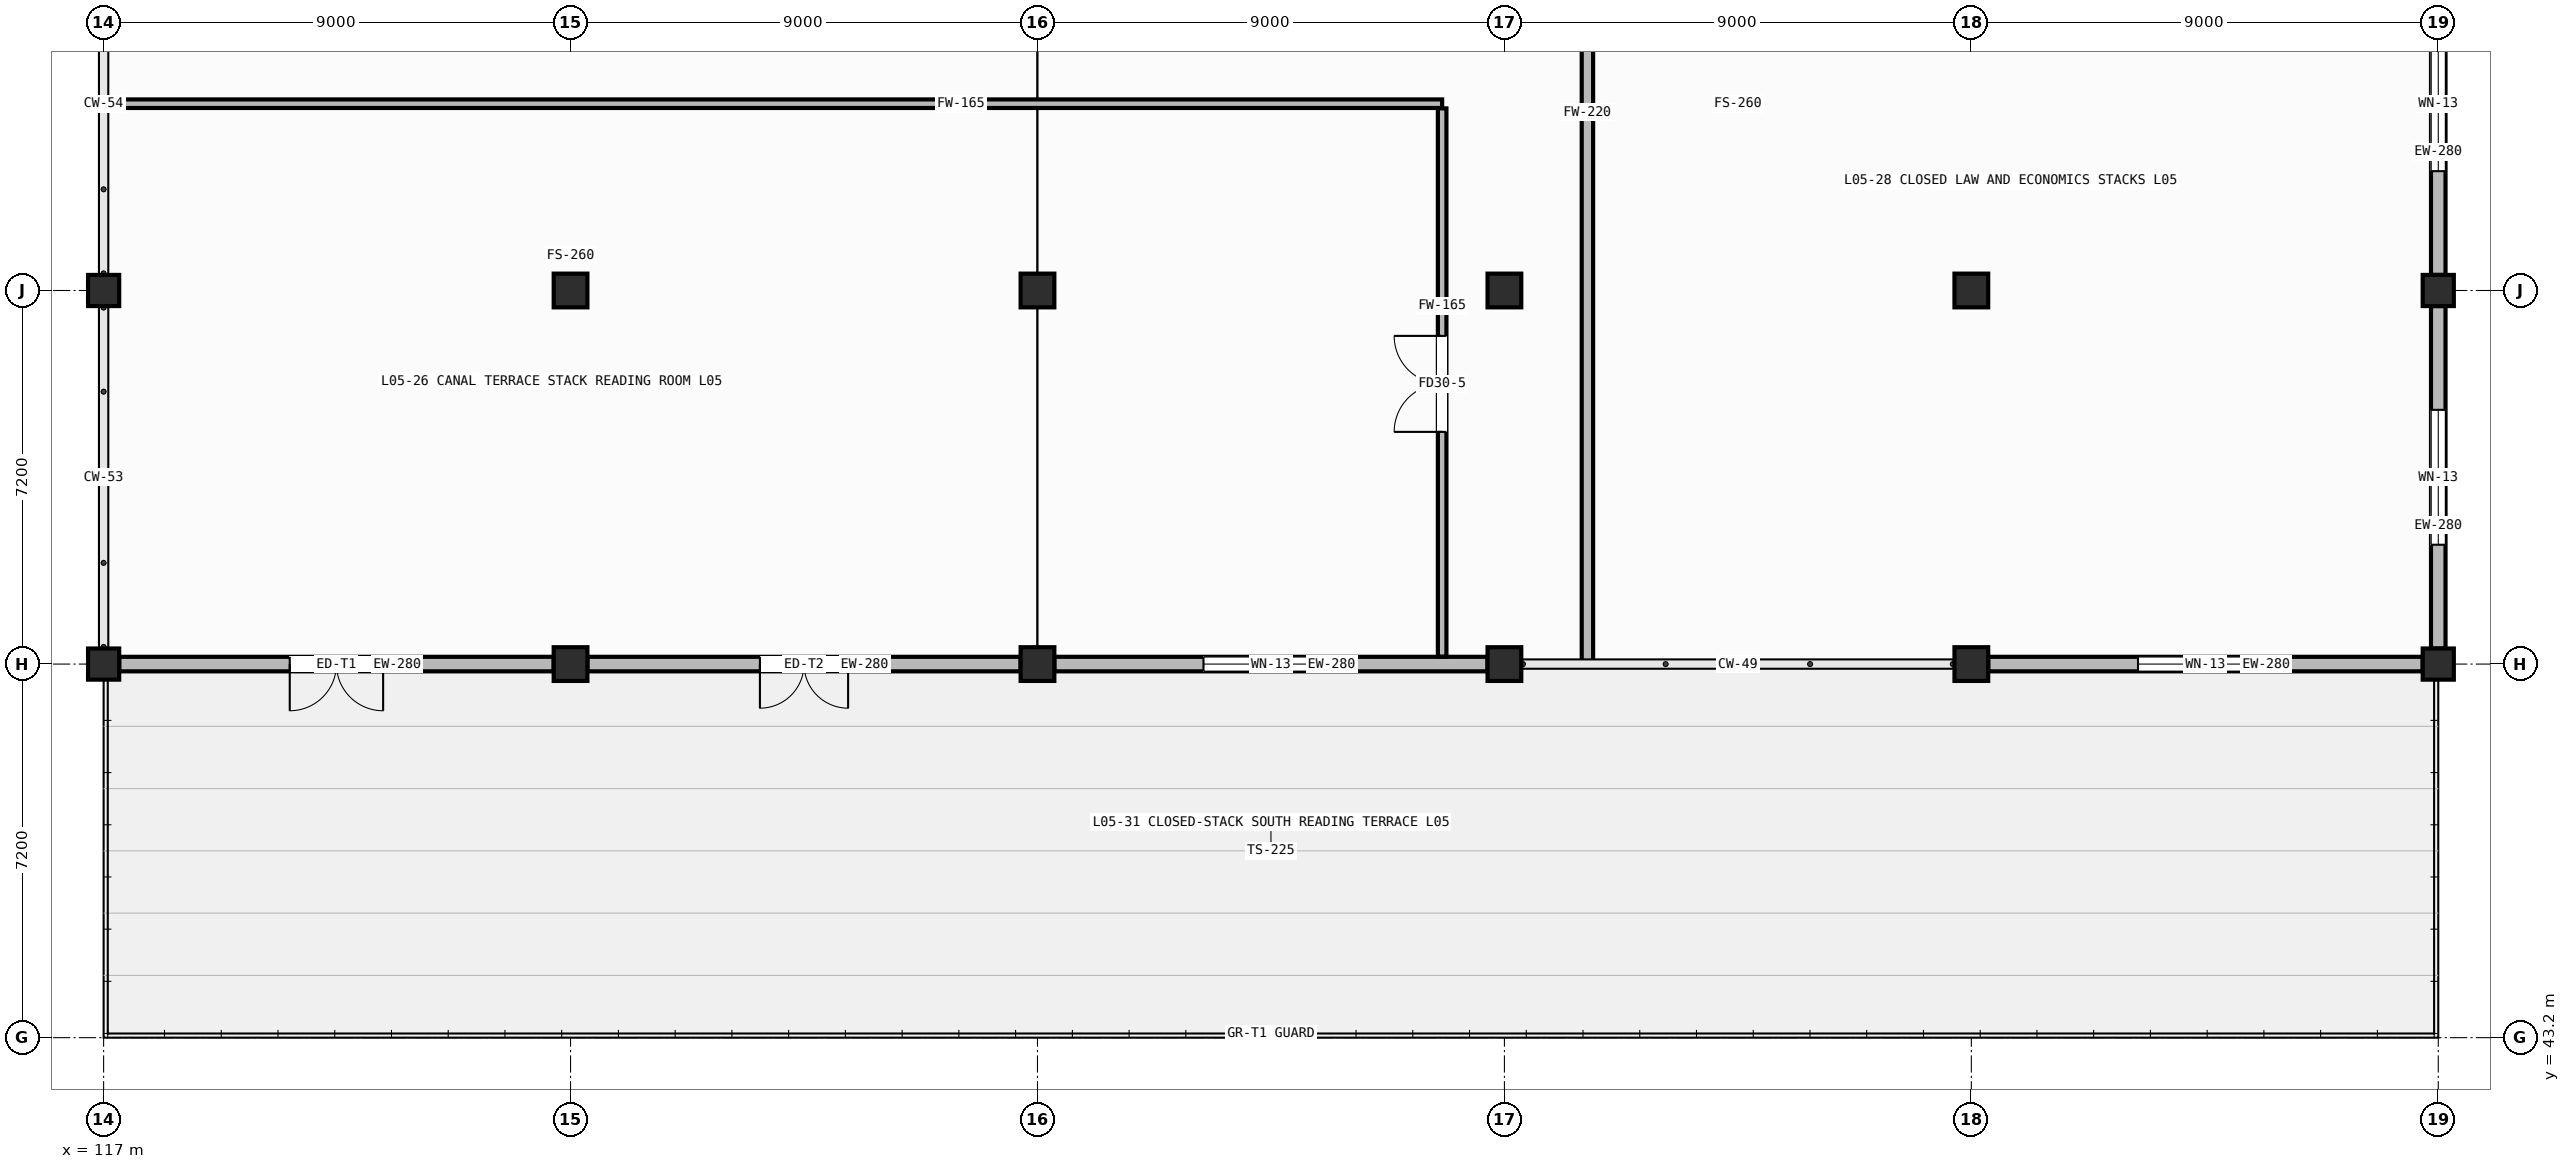
"""IFC4 building model, lengths in metres.
Left out: names, types, materials, properties, quantities, classifications, styles, units other than length and angle.
Written with IfcOpenShell. Run it as: python <this file> out.ifc"""

import sys

from ifc_helpers import new_model, si_unit, direction, frame, frame_2d, origin, origin_2d, place, context, subcontext, project, spatial, rectangle, hollow_rectangle, extrude, element, fill, save


model = new_model("IFC4")
c1 = context("Model", 3, precision=1e-05, world=origin(), true_north=direction((0.0, 1.0)))
c2 = subcontext(c1, "Body", "Model", "MODEL_VIEW")
j1 = project(units=[si_unit("LENGTHUNIT", "METRE"), si_unit("PLANEANGLEUNIT", "RADIAN")], contexts=[c1])
p1 = place(None, origin())
s1 = spatial("IfcSite", under=j1, at=p1, CompositionType="ELEMENT")
p2 = place(p1, origin())
s2 = spatial("IfcBuilding", under=s1, at=p2, CompositionType="ELEMENT")
p3 = place(p2, frame((0.0, 0.0, 17.0)))
s3 = spatial("IfcBuildingStorey", under=s2, at=p3, CompositionType="ELEMENT", Elevation=17.0)
p4 = place(p3, frame((117.0, 50.4, 0.0), z_axis=(0.0, 0.0, 1.0), x_axis=(1.0, 0.0, 0.0)))
e1 = element("IfcColumn", 1, at=p4, inside=s3, PredefinedType="COLUMN", context=c2, shape_type="SweptSolid", body=[
    extrude(hollow_rectangle(XDim=0.6, YDim=0.6, WallThickness=0.025, at=origin_2d()), origin(), (0.0, 0.0, 1.0), 3.36),
])
p5 = place(p3, frame((117.0, 57.6, 0.0), z_axis=(0.0, 0.0, 1.0), x_axis=(1.0, 0.0, 0.0)))
e2 = element("IfcColumn", 2, at=p5, inside=s3, PredefinedType="COLUMN", context=c2, shape_type="SweptSolid", body=[
    extrude(hollow_rectangle(XDim=0.6, YDim=0.6, WallThickness=0.025, at=origin_2d()), origin(), (0.0, 0.0, 1.0), 3.6),
])
p6 = place(p3, frame((126.0, 50.4, 0.0), z_axis=(0.0, 0.0, 1.0), x_axis=(1.0, 0.0, 0.0)))
e3 = element("IfcColumn", 3, at=p6, inside=s3, PredefinedType="COLUMN", context=c2, shape_type="SweptSolid", body=[
    extrude(hollow_rectangle(XDim=0.65, YDim=0.65, WallThickness=0.025, at=origin_2d()), origin(), (0.0, 0.0, 1.0), 3.36),
])
p7 = place(p3, frame((126.0, 57.6, 0.0), z_axis=(0.0, 0.0, 1.0), x_axis=(1.0, 0.0, 0.0)))
e4 = element("IfcColumn", 4, at=p7, inside=s3, PredefinedType="COLUMN", context=c2, shape_type="SweptSolid", body=[
    extrude(hollow_rectangle(XDim=0.65, YDim=0.65, WallThickness=0.025, at=origin_2d()), origin(), (0.0, 0.0, 1.0), 3.6),
])
p8 = place(p3, frame((135.0, 50.4, 0.0), z_axis=(0.0, 0.0, 1.0), x_axis=(1.0, 0.0, 0.0)))
e5 = element("IfcColumn", 5, at=p8, inside=s3, PredefinedType="COLUMN", context=c2, shape_type="SweptSolid", body=[
    extrude(hollow_rectangle(XDim=0.65, YDim=0.65, WallThickness=0.025, at=origin_2d()), origin(), (0.0, 0.0, 1.0), 3.36),
])
p9 = place(p3, frame((135.0, 57.6, 0.0), z_axis=(0.0, 0.0, 1.0), x_axis=(1.0, 0.0, 0.0)))
e6 = element("IfcColumn", 6, at=p9, inside=s3, PredefinedType="COLUMN", context=c2, shape_type="SweptSolid", body=[
    extrude(hollow_rectangle(XDim=0.65, YDim=0.65, WallThickness=0.025, at=origin_2d()), origin(), (0.0, 0.0, 1.0), 3.6),
])
p10 = place(p3, frame((144.0, 50.4, 0.0), z_axis=(0.0, 0.0, 1.0), x_axis=(1.0, 0.0, 0.0)))
e7 = element("IfcColumn", 7, at=p10, inside=s3, PredefinedType="COLUMN", context=c2, shape_type="SweptSolid", body=[
    extrude(hollow_rectangle(XDim=0.65, YDim=0.65, WallThickness=0.025, at=origin_2d()), origin(), (0.0, 0.0, 1.0), 3.36),
])
p11 = place(p3, frame((144.0, 57.6, 0.0), z_axis=(0.0, 0.0, 1.0), x_axis=(1.0, 0.0, 0.0)))
e8 = element("IfcColumn", 8, at=p11, inside=s3, PredefinedType="COLUMN", context=c2, shape_type="SweptSolid", body=[
    extrude(hollow_rectangle(XDim=0.65, YDim=0.65, WallThickness=0.025, at=origin_2d()), origin(), (0.0, 0.0, 1.0), 3.6),
])
p12 = place(p3, frame((153.0, 50.4, 0.0), z_axis=(0.0, 0.0, 1.0), x_axis=(1.0, 0.0, 0.0)))
e9 = element("IfcColumn", 9, at=p12, inside=s3, PredefinedType="COLUMN", context=c2, shape_type="SweptSolid", body=[
    extrude(hollow_rectangle(XDim=0.65, YDim=0.65, WallThickness=0.025, at=origin_2d()), origin(), (0.0, 0.0, 1.0), 3.36),
])
p13 = place(p3, frame((153.0, 57.6, 0.0), z_axis=(0.0, 0.0, 1.0), x_axis=(1.0, 0.0, 0.0)))
e10 = element("IfcColumn", 10, at=p13, inside=s3, PredefinedType="COLUMN", context=c2, shape_type="SweptSolid", body=[
    extrude(hollow_rectangle(XDim=0.65, YDim=0.65, WallThickness=0.025, at=origin_2d()), origin(), (0.0, 0.0, 1.0), 3.6),
])
p14 = place(p3, frame((162.0, 50.4, 0.0), z_axis=(0.0, 0.0, 1.0), x_axis=(1.0, 0.0, 0.0)))
e11 = element("IfcColumn", 11, at=p14, inside=s3, PredefinedType="COLUMN", context=c2, shape_type="SweptSolid", body=[
    extrude(hollow_rectangle(XDim=0.6, YDim=0.6, WallThickness=0.025, at=origin_2d()), origin(), (0.0, 0.0, 1.0), 3.36),
])
p15 = place(p3, frame((162.0, 57.6, 0.0), z_axis=(0.0, 0.0, 1.0), x_axis=(1.0, 0.0, 0.0)))
e12 = element("IfcColumn", 12, at=p15, inside=s3, PredefinedType="COLUMN", context=c2, shape_type="SweptSolid", body=[
    extrude(hollow_rectangle(XDim=0.6, YDim=0.6, WallThickness=0.025, at=origin_2d()), origin(), (0.0, 0.0, 1.0), 3.6),
])
p16 = place(p3, frame((117.3, 50.4, 0.0), z_axis=(0.0, 0.0, 1.0), x_axis=(1.0, 0.0, 0.0)))
e13 = element("IfcWall", 13, at=p16, inside=s3, PredefinedType="STANDARD", context=c2, shape_type="SweptSolid", body=[
    extrude(rectangle(XDim=8.375, YDim=0.28, at=frame_2d((4.188, 0.0))), origin(), (0.0, 0.0, 1.0), 2.97),
])
p17 = place(p16, frame((3.288, 0.0, 0.0)))
e14 = element("IfcOpeningElement", 14, at=p17, cuts=e13, PredefinedType="OPENING", context=c2, shape_type="SweptSolid", body=[
    extrude(rectangle(XDim=1.8, YDim=2.1, at=frame_2d((0.9, 1.05))), frame((0.0, 0.152, 0.0), z_axis=(0.0, -1.0, 0.0), x_axis=(1.0, 0.0, 0.0)), (0.0, 0.0, 1.0), 0.304),
])
p18 = place(p3, frame((126.325, 50.4, 0.0), z_axis=(0.0, 0.0, 1.0), x_axis=(1.0, 0.0, 0.0)))
e15 = element("IfcWall", 15, at=p18, inside=s3, PredefinedType="STANDARD", context=c2, shape_type="SweptSolid", body=[
    extrude(rectangle(XDim=8.35, YDim=0.28, at=frame_2d((4.175, 0.0))), origin(), (0.0, 0.0, 1.0), 2.97),
])
p19 = place(p18, frame((3.325, 0.0, 0.0)))
e16 = element("IfcOpeningElement", 16, at=p19, cuts=e15, PredefinedType="OPENING", context=c2, shape_type="SweptSolid", body=[
    extrude(rectangle(XDim=1.7, YDim=2.08, at=frame_2d((0.85, 1.04))), frame((0.0, 0.152, 0.0), z_axis=(0.0, -1.0, 0.0), x_axis=(1.0, 0.0, 0.0)), (0.0, 0.0, 1.0), 0.304),
])
p20 = place(p3, frame((135.325, 50.4, 0.0), z_axis=(0.0, 0.0, 1.0), x_axis=(1.0, 0.0, 0.0)))
e17 = element("IfcWall", 17, at=p20, inside=s3, PredefinedType="STANDARD", context=c2, shape_type="SweptSolid", body=[
    extrude(rectangle(XDim=8.35, YDim=0.28, at=frame_2d((4.175, 0.0))), origin(), (0.0, 0.0, 1.0), 2.97),
])
p21 = place(p20, frame((2.875, 0.0, 0.85)))
e18 = element("IfcOpeningElement", 18, at=p21, cuts=e17, PredefinedType="OPENING", context=c2, shape_type="SweptSolid", body=[
    extrude(rectangle(XDim=2.6, YDim=1.6, at=frame_2d((1.3, 0.8))), frame((0.0, 0.152, 0.0), z_axis=(0.0, -1.0, 0.0), x_axis=(1.0, 0.0, 0.0)), (0.0, 0.0, 1.0), 0.304),
])
p22 = place(p3, frame((153.325, 50.4, 0.0), z_axis=(0.0, 0.0, 1.0), x_axis=(1.0, 0.0, 0.0)))
e19 = element("IfcWall", 19, at=p22, inside=s3, PredefinedType="STANDARD", context=c2, shape_type="SweptSolid", body=[
    extrude(rectangle(XDim=8.375, YDim=0.28, at=frame_2d((4.188, 0.0))), origin(), (0.0, 0.0, 1.0), 2.97),
])
p23 = place(p22, frame((2.887, 0.0, 0.85)))
e20 = element("IfcOpeningElement", 20, at=p23, cuts=e19, PredefinedType="OPENING", context=c2, shape_type="SweptSolid", body=[
    extrude(rectangle(XDim=2.6, YDim=1.6, at=frame_2d((1.3, 0.8))), frame((0.0, 0.152, 0.0), z_axis=(0.0, -1.0, 0.0), x_axis=(1.0, 0.0, 0.0)), (0.0, 0.0, 1.0), 0.304),
])
p24 = place(p3, frame((162.0, 57.3, 0.0), z_axis=(0.0, 0.0, 1.0), x_axis=(0.0, -1.0, 0.0)))
e21 = element("IfcWall", 21, at=p24, inside=s3, PredefinedType="STANDARD", context=c2, shape_type="SweptSolid", body=[
    extrude(rectangle(XDim=6.6, YDim=0.28, at=frame_2d((3.3, 0.0))), origin(), (0.0, 0.0, 1.0), 2.96),
])
p25 = place(p24, frame((2.0, 0.0, 0.85)))
e22 = element("IfcOpeningElement", 22, at=p25, cuts=e21, PredefinedType="OPENING", context=c2, shape_type="SweptSolid", body=[
    extrude(rectangle(XDim=2.6, YDim=1.6, at=frame_2d((1.3, 0.8))), frame((0.0, 0.152, 0.0), z_axis=(0.0, -1.0, 0.0), x_axis=(1.0, 0.0, 0.0)), (0.0, 0.0, 1.0), 0.304),
])
p26 = place(p3, frame((162.0, 64.5, 0.0), z_axis=(0.0, 0.0, 1.0), x_axis=(0.0, -1.0, 0.0)))
e23 = element("IfcWall", 23, at=p26, inside=s3, PredefinedType="STANDARD", context=c2, shape_type="SweptSolid", body=[
    extrude(rectangle(XDim=6.6, YDim=0.28, at=frame_2d((3.3, 0.0))), origin(), (0.0, 0.0, 1.0), 2.94),
])
p27 = place(p26, frame((2.0, 0.0, 0.85)))
e24 = element("IfcOpeningElement", 24, at=p27, cuts=e23, PredefinedType="OPENING", context=c2, shape_type="SweptSolid", body=[
    extrude(rectangle(XDim=2.6, YDim=1.6, at=frame_2d((1.3, 0.8))), frame((0.0, 0.152, 0.0), z_axis=(0.0, -1.0, 0.0), x_axis=(1.0, 0.0, 0.0)), (0.0, 0.0, 1.0), 0.304),
])
p28 = place(p3, frame((117.035, 61.2, 0.0), z_axis=(0.0, 0.0, 1.0), x_axis=(1.0, 0.0, 0.0)))
e25 = element("IfcWall", 25, at=p28, inside=s3, PredefinedType="PARTITIONING", context=c2, shape_type="SweptSolid", body=[
    extrude(rectangle(XDim=25.765, YDim=0.165, at=frame_2d((12.883, 0.0))), origin(), (0.0, 0.0, 1.0), 2.91),
])
p29 = place(p3, frame((142.8, 50.545, 0.0), z_axis=(0.0, 0.0, 1.0), x_axis=(0.0, 1.0, 0.0)))
e26 = element("IfcWall", 26, at=p29, inside=s3, PredefinedType="PARTITIONING", context=c2, shape_type="SweptSolid", body=[
    extrude(rectangle(XDim=10.565, YDim=0.165, at=frame_2d((5.283, 0.0))), origin(), (0.0, 0.0, 1.0), 3.36),
])
p30 = place(p29, frame((4.33, 0.0, 0.0)))
e27 = element("IfcOpeningElement", 27, at=p30, cuts=e26, PredefinedType="OPENING", context=c2, shape_type="SweptSolid", body=[
    extrude(rectangle(XDim=1.85, YDim=2.12, at=frame_2d((0.925, 1.06))), frame((0.0, 0.094, 0.0), z_axis=(0.0, -1.0, 0.0), x_axis=(1.0, 0.0, 0.0)), (0.0, 0.0, 1.0), 0.189),
])
p31 = place(p3, frame((145.6, 50.435, 0.0), z_axis=(0.0, 0.0, 1.0), x_axis=(0.0, 1.0, 0.0)))
e28 = element("IfcWall", 28, at=p31, inside=s3, PredefinedType="PARTITIONING", context=c2, shape_type="SweptSolid", body=[
    extrude(rectangle(XDim=23.875, YDim=0.22, at=frame_2d((11.938, 0.0))), origin(), (0.0, 0.0, 1.0), 3.34),
])
p32 = place(p31, frame((15.165, 0.0, 0.0)))
e29 = element("IfcOpeningElement", 29, at=p32, cuts=e28, PredefinedType="OPENING", context=c2, shape_type="SweptSolid", body=[
    extrude(rectangle(XDim=1.6, YDim=2.12, at=frame_2d((0.8, 1.06))), frame((0.0, 0.122, 0.0), z_axis=(0.0, -1.0, 0.0), x_axis=(1.0, 0.0, 0.0)), (0.0, 0.0, 1.0), 0.244),
])
p33 = place(p17, frame((1.8, 0.0, 0.0), z_axis=(0.0, 0.0, 1.0), x_axis=(-1.0, 0.0, 0.0)))
e30 = element("IfcDoor", 30, at=p33, inside=s3, OperationType="DOUBLE_DOOR_SINGLE_SWING", PredefinedType="DOOR", context=c2, shape_type="SweptSolid", body=[
    extrude(rectangle(XDim=1.8, YDim=2.1, at=frame_2d((0.9, 1.05))), frame((0.0, 0.025, 0.0), z_axis=(0.0, -1.0, 0.0), x_axis=(1.0, 0.0, 0.0)), (0.0, 0.0, 1.0), 0.05),
])
fill(e14, e30)
p34 = place(p19, frame((1.7, 0.0, 0.0), z_axis=(0.0, 0.0, 1.0), x_axis=(-1.0, 0.0, 0.0)))
e31 = element("IfcDoor", 31, at=p34, inside=s3, OperationType="DOUBLE_DOOR_SINGLE_SWING", PredefinedType="DOOR", context=c2, shape_type="SweptSolid", body=[
    extrude(rectangle(XDim=1.7, YDim=2.08, at=frame_2d((0.85, 1.04))), frame((0.0, 0.025, 0.0), z_axis=(0.0, -1.0, 0.0), x_axis=(1.0, 0.0, 0.0)), (0.0, 0.0, 1.0), 0.05),
])
fill(e16, e31)
p35 = place(p21, origin())
e32 = element("IfcWindow", 32, at=p35, inside=s3, PartitioningType="DOUBLE_PANEL_VERTICAL", PredefinedType="WINDOW", context=c2, shape_type="SweptSolid", body=[
    extrude(rectangle(XDim=2.6, YDim=1.6, at=frame_2d((1.3, 0.8))), frame((0.0, 0.03, 0.0), z_axis=(0.0, -1.0, 0.0), x_axis=(1.0, 0.0, 0.0)), (0.0, 0.0, 1.0), 0.06),
])
fill(e18, e32)
p36 = place(p23, origin())
e33 = element("IfcWindow", 33, at=p36, inside=s3, PartitioningType="DOUBLE_PANEL_VERTICAL", PredefinedType="WINDOW", context=c2, shape_type="SweptSolid", body=[
    extrude(rectangle(XDim=2.6, YDim=1.6, at=frame_2d((1.3, 0.8))), frame((0.0, 0.03, 0.0), z_axis=(0.0, -1.0, 0.0), x_axis=(1.0, 0.0, 0.0)), (0.0, 0.0, 1.0), 0.06),
])
fill(e20, e33)
p37 = place(p25, origin())
e34 = element("IfcWindow", 34, at=p37, inside=s3, PartitioningType="DOUBLE_PANEL_VERTICAL", PredefinedType="WINDOW", context=c2, shape_type="SweptSolid", body=[
    extrude(rectangle(XDim=2.6, YDim=1.6, at=frame_2d((1.3, 0.8))), frame((0.0, 0.03, 0.0), z_axis=(0.0, -1.0, 0.0), x_axis=(1.0, 0.0, 0.0)), (0.0, 0.0, 1.0), 0.06),
])
fill(e22, e34)
p38 = place(p27, origin())
e35 = element("IfcWindow", 35, at=p38, inside=s3, PartitioningType="DOUBLE_PANEL_VERTICAL", PredefinedType="WINDOW", context=c2, shape_type="SweptSolid", body=[
    extrude(rectangle(XDim=2.6, YDim=1.6, at=frame_2d((1.3, 0.8))), frame((0.0, 0.03, 0.0), z_axis=(0.0, -1.0, 0.0), x_axis=(1.0, 0.0, 0.0)), (0.0, 0.0, 1.0), 0.06),
])
fill(e24, e35)
p39 = place(p30, origin())
e36 = element("IfcDoor", 36, at=p39, inside=s3, OperationType="DOUBLE_DOOR_SINGLE_SWING", PredefinedType="DOOR", context=c2, shape_type="SweptSolid", body=[
    extrude(rectangle(XDim=1.85, YDim=2.12, at=frame_2d((0.925, 1.06))), frame((0.0, 0.025, 0.0), z_axis=(0.0, -1.0, 0.0), x_axis=(1.0, 0.0, 0.0)), (0.0, 0.0, 1.0), 0.05),
])
fill(e27, e36)
save(model, sys.argv[1])
